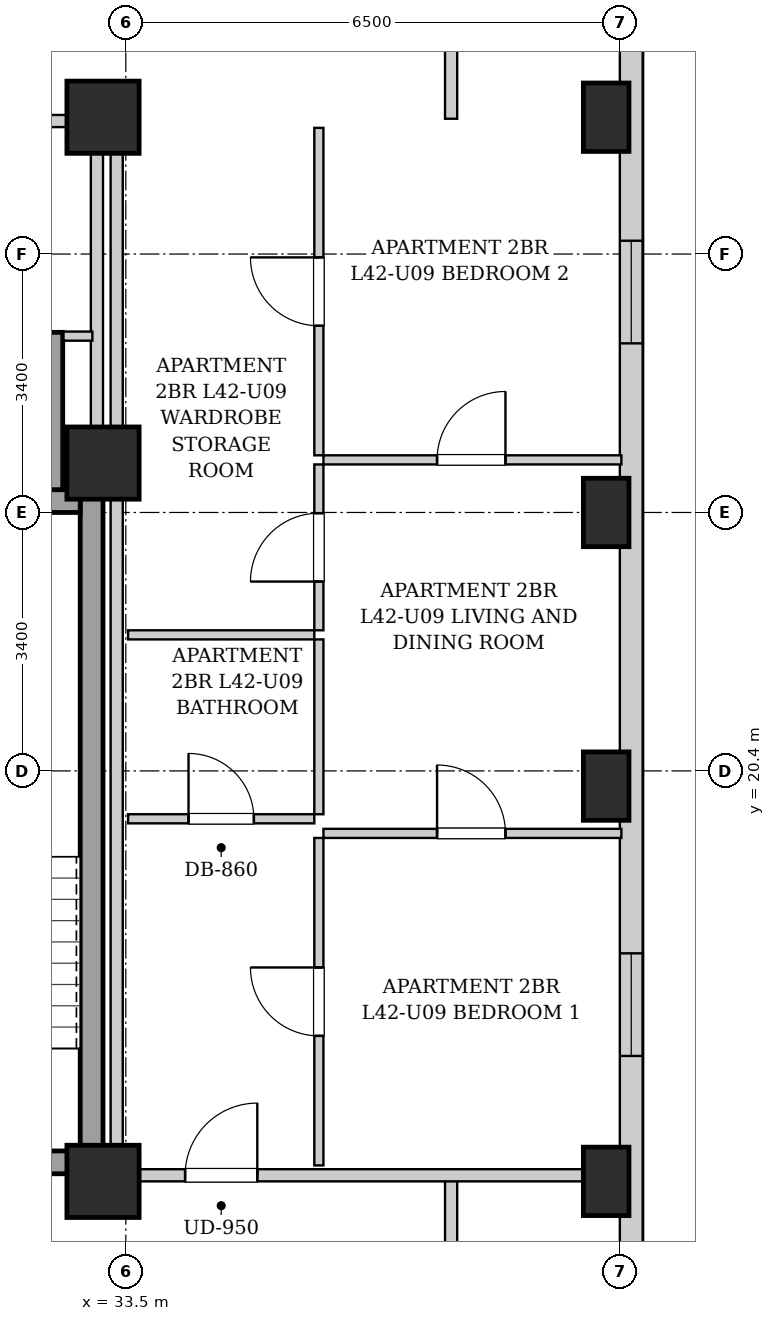
"""IFC4 building model, lengths in metres.
Left out: names, types, materials, properties, quantities, classifications, styles, units other than length and angle.
Written with IfcOpenShell. Run it as: python <this file> out.ifc"""

import sys

from ifc_helpers import new_model, si_unit, direction, frame, frame_2d, origin, origin_2d, place, context, subcontext, project, spatial, rectangle, extrude, element, fill, save


model = new_model("IFC4")
c1 = context("Model", 3, precision=1e-05, world=origin(), true_north=direction((0.0, 1.0)))
c2 = subcontext(c1, "Body", "Model", "MODEL_VIEW")
j1 = project(units=[si_unit("LENGTHUNIT", "METRE"), si_unit("PLANEANGLEUNIT", "RADIAN")], contexts=[c1])
p1 = place(None, origin())
s1 = spatial("IfcSite", under=j1, at=p1, CompositionType="ELEMENT")
p2 = place(p1, origin())
s2 = spatial("IfcBuilding", under=s1, at=p2, CompositionType="ELEMENT")
p3 = place(p2, frame((0.0, 0.0, 147.15)))
s3 = spatial("IfcBuildingStorey", under=s2, at=p3, CompositionType="ELEMENT", Elevation=147.15)
for number, where, z_axis, x_axis in (
    (1, (39.82, 15.0, 0.0), (0.0, 0.0, 1.0), (1.0, 0.0, 0.0)),
    (2, (39.82, 20.2, 0.0), (0.0, 0.0, 1.0), (1.0, 0.0, 0.0)),
    (3, (39.82, 23.8, 0.0), (0.0, 0.0, 1.0), (1.0, 0.0, 0.0)),
    (4, (39.82, 29.0, 0.0), (0.0, 0.0, 1.0), (1.0, 0.0, 0.0)),
):
    element("IfcColumn", number, at=place(p3, frame(where, z_axis=z_axis, x_axis=x_axis)), inside=s3, PredefinedType="COLUMN", context=c2, shape_type="SweptSolid", body=[
        extrude(rectangle(XDim=0.6, YDim=0.9, at=origin_2d()), origin(), (0.0, 0.0, 1.0), 3.25),
    ])
for number, where, z_axis, x_axis in (
    (5, (33.2, 15.0, 0.0), (0.0, 0.0, 1.0), (1.0, 0.0, 0.0)),
    (6, (33.2, 29.0, 0.0), (0.0, 0.0, 1.0), (1.0, 0.0, 0.0)),
    (7, (33.2, 24.45, 0.0), (0.0, 0.0, 1.0), (1.0, 0.0, 0.0)),
):
    element("IfcColumn", number, at=place(p3, frame(where, z_axis=z_axis, x_axis=x_axis)), inside=s3, PredefinedType="COLUMN", context=c2, shape_type="SweptSolid", body=[
        extrude(rectangle(XDim=0.95, YDim=0.95, at=origin_2d()), origin(), (0.0, 0.0, 1.0), 3.25),
    ])
p4 = place(p3, frame((40.15, 40.8, 0.0), z_axis=(0.0, 0.0, 1.0), x_axis=(0.0, -1.0, 0.0)))
e8 = element("IfcWall", 8, at=p4, inside=s3, PredefinedType="SOLIDWALL", context=c2, shape_type="SweptSolid", body=[
    extrude(rectangle(XDim=34.5, YDim=0.3, at=frame_2d((17.25, 0.0))), origin(), (0.0, 0.0, 1.0), 2.99),
])
p5 = place(p4, frame((31.575, 0.0, 0.55)))
e9 = element("IfcOpeningElement", 9, at=p5, cuts=e8, PredefinedType="OPENING", context=c2, shape_type="SweptSolid", body=[
    extrude(rectangle(XDim=1.35, YDim=1.2, at=frame_2d((0.675, 0.6))), frame((0.0, 0.16, 0.0), z_axis=(0.0, -1.0, 0.0), x_axis=(1.0, 0.0, 0.0)), (0.0, 0.0, 1.0), 0.32),
])
p6 = place(p4, frame((3.075, 0.0, 0.55)))
e10 = element("IfcOpeningElement", 10, at=p6, cuts=e8, PredefinedType="OPENING", context=c2, shape_type="SweptSolid", body=[
    extrude(rectangle(XDim=1.35, YDim=1.2, at=frame_2d((0.675, 0.6))), frame((0.0, 0.16, 0.0), z_axis=(0.0, -1.0, 0.0), x_axis=(1.0, 0.0, 0.0)), (0.0, 0.0, 1.0), 0.32),
])
p7 = place(p4, frame((1.085, 0.0, 0.55)))
e11 = element("IfcOpeningElement", 11, at=p7, cuts=e8, PredefinedType="OPENING", context=c2, shape_type="SweptSolid", body=[
    extrude(rectangle(XDim=1.35, YDim=1.2, at=frame_2d((0.675, 0.6))), frame((0.0, 0.16, 0.0), z_axis=(0.0, -1.0, 0.0), x_axis=(1.0, 0.0, 0.0)), (0.0, 0.0, 1.0), 0.32),
])
p8 = place(p4, frame((22.8, 0.0, 0.55)))
e12 = element("IfcOpeningElement", 12, at=p8, cuts=e8, PredefinedType="OPENING", context=c2, shape_type="SweptSolid", body=[
    extrude(rectangle(XDim=1.35, YDim=1.2, at=frame_2d((0.675, 0.6))), frame((0.0, 0.16, 0.0), z_axis=(0.0, -1.0, 0.0), x_axis=(1.0, 0.0, 0.0)), (0.0, 0.0, 1.0), 0.32),
])
p9 = place(p4, frame((13.425, 0.0, 0.55)))
e13 = element("IfcOpeningElement", 13, at=p9, cuts=e8, PredefinedType="OPENING", context=c2, shape_type="SweptSolid", body=[
    extrude(rectangle(XDim=1.35, YDim=1.2, at=frame_2d((0.675, 0.6))), frame((0.0, 0.16, 0.0), z_axis=(0.0, -1.0, 0.0), x_axis=(1.0, 0.0, 0.0)), (0.0, 0.0, 1.0), 0.32),
])
p10 = place(p3, frame((33.05, 15.1, 0.0), z_axis=(0.0, 0.0, 1.0), x_axis=(0.0, 1.0, 0.0)))
e14 = element("IfcWall", 14, at=p10, inside=s3, PredefinedType="SHEAR", context=c2, shape_type="SweptSolid", body=[
    extrude(rectangle(XDim=9.0, YDim=0.3, at=frame_2d((4.5, 0.0))), origin(), (0.0, 0.0, 1.0), 2.99),
])
p11 = place(p3, frame((30.05, 23.95, 0.0), z_axis=(0.0, 0.0, 1.0), x_axis=(1.0, 0.0, 0.0)))
e15 = element("IfcWall", 15, at=p11, inside=s3, PredefinedType="SHEAR", context=c2, shape_type="SweptSolid", body=[
    extrude(rectangle(XDim=2.85, YDim=0.3, at=frame_2d((1.425, 0.0))), origin(), (0.0, 0.0, 1.0), 2.99),
])
p12 = place(p3, frame((30.05, 15.25, 0.0), z_axis=(0.0, 0.0, 1.0), x_axis=(1.0, 0.0, 0.0)))
e16 = element("IfcWall", 16, at=p12, inside=s3, PredefinedType="SHEAR", context=c2, shape_type="SweptSolid", body=[
    extrude(rectangle(XDim=2.85, YDim=0.3, at=frame_2d((1.425, 0.0))), origin(), (0.0, 0.0, 1.0), 2.99),
])
p13 = place(p12, frame((0.86, 0.0, 0.0)))
e17 = element("IfcOpeningElement", 17, at=p13, cuts=e16, PredefinedType="OPENING", context=c2, shape_type="SweptSolid", body=[
    extrude(rectangle(XDim=1.1, YDim=2.05, at=frame_2d((0.55, 1.025))), frame((0.0, 0.16, 0.0), z_axis=(0.0, -1.0, 0.0), x_axis=(1.0, 0.0, 0.0)), (0.0, 0.0, 1.0), 0.32),
])
p14 = place(p3, frame((32.56, 24.1, 0.0), z_axis=(0.0, 0.0, 1.0), x_axis=(0.0, 1.0, 0.0)))
e18 = element("IfcWall", 18, at=p14, inside=s3, PredefinedType="SHEAR", context=c2, shape_type="SweptSolid", body=[
    extrude(rectangle(XDim=2.07, YDim=0.22, at=frame_2d((1.035, 0.0))), origin(), (0.0, 0.0, 1.0), 2.99),
])
p15 = place(p3, frame((33.12, 24.12, 0.0), z_axis=(0.0, 0.0, 1.0), x_axis=(0.0, 1.0, 0.0)))
e19 = element("IfcWall", 19, at=p15, inside=s3, PredefinedType="PARTITIONING", context=c2, shape_type="SweptSolid", body=[
    extrude(rectangle(XDim=4.76, YDim=0.16, at=frame_2d((2.38, 0.0))), origin(), (0.0, 0.0, 1.0), 2.325),
])
p16 = place(p3, frame((32.68, 26.12, 0.0), z_axis=(0.0, 0.0, 1.0), x_axis=(1.0, 0.0, 0.0)))
e20 = element("IfcWall", 20, at=p16, inside=s3, PredefinedType="PARTITIONING", context=c2, shape_type="SweptSolid", body=[
    extrude(rectangle(XDim=0.38, YDim=0.12, at=frame_2d((0.19, 0.0))), origin(), (0.0, 0.0, 1.0), 2.99),
])
p17 = place(p3, frame((30.08, 28.95, 0.0), z_axis=(0.0, 0.0, 1.0), x_axis=(1.0, 0.0, 0.0)))
e21 = element("IfcWall", 21, at=p17, inside=s3, PredefinedType="PARTITIONING", context=c2, shape_type="SweptSolid", body=[
    extrude(rectangle(XDim=2.96, YDim=0.16, at=frame_2d((1.48, 0.0))), origin(), (0.0, 0.0, 1.0), 2.99),
])
p18 = place(p17, frame((1.045, 0.0, 0.0)))
e22 = element("IfcOpeningElement", 22, at=p18, cuts=e21, PredefinedType="OPENING", context=c2, shape_type="SweptSolid", body=[
    extrude(rectangle(XDim=0.86, YDim=2.05, at=frame_2d((0.43, 1.025))), frame((0.0, 0.09, 0.0), z_axis=(0.0, -1.0, 0.0), x_axis=(1.0, 0.0, 0.0)), (0.0, 0.0, 1.0), 0.18),
])
for number, where, z_axis, x_axis in (
    (23, (37.78, 13.35, 0.0), (0.0, 0.0, 1.0), (0.0, 1.0, 0.0)),
    (24, (37.78, 28.98, 0.0), (0.0, 0.0, 1.0), (0.0, 1.0, 0.0)),
):
    element("IfcWall", number, at=place(p3, frame(where, z_axis=z_axis, x_axis=x_axis)), inside=s3, PredefinedType="PARTITIONING", context=c2, shape_type="SweptSolid", body=[
        extrude(rectangle(XDim=1.74, YDim=0.16, at=frame_2d((0.87, 0.0))), origin(), (0.0, 0.0, 1.0), 2.99),
    ])
p19 = place(p3, frame((33.38, 15.08, 0.0), z_axis=(0.0, 0.0, 1.0), x_axis=(1.0, 0.0, 0.0)))
e25 = element("IfcWall", 25, at=p19, inside=s3, PredefinedType="PARTITIONING", context=c2, shape_type="SweptSolid", body=[
    extrude(rectangle(XDim=6.64, YDim=0.16, at=frame_2d((3.32, 0.0))), origin(), (0.0, 0.0, 1.0), 2.442),
])
p20 = place(p19, frame((0.9, 0.0, 0.0)))
e26 = element("IfcOpeningElement", 26, at=p20, cuts=e25, PredefinedType="OPENING", context=c2, shape_type="SweptSolid", body=[
    extrude(rectangle(XDim=0.95, YDim=2.1, at=frame_2d((0.475, 1.05))), frame((0.0, 0.09, 0.0), z_axis=(0.0, -1.0, 0.0), x_axis=(1.0, 0.0, 0.0)), (0.0, 0.0, 1.0), 0.18),
])
p21 = place(p3, frame((33.53, 22.19, 0.0), z_axis=(0.0, 0.0, 1.0), x_axis=(1.0, 0.0, 0.0)))
e27 = element("IfcWall", 27, at=p21, inside=s3, PredefinedType="PARTITIONING", context=c2, shape_type="SweptSolid", body=[
    extrude(rectangle(XDim=2.45, YDim=0.12, at=frame_2d((1.225, 0.0))), origin(), (0.0, 0.0, 1.0), 2.99),
])
p22 = place(p3, frame((36.04, 22.25, 0.0), z_axis=(0.0, 0.0, 1.0), x_axis=(0.0, 1.0, 0.0)))
e28 = element("IfcWall", 28, at=p22, inside=s3, PredefinedType="PARTITIONING", context=c2, shape_type="SweptSolid", body=[
    extrude(rectangle(XDim=2.182, YDim=0.12, at=frame_2d((1.091, 0.0))), origin(), (0.0, 0.0, 1.0), 2.99),
])
p23 = place(p22, frame((0.641, 0.0, 0.0)))
e29 = element("IfcOpeningElement", 29, at=p23, cuts=e28, PredefinedType="OPENING", context=c2, shape_type="SweptSolid", body=[
    extrude(rectangle(XDim=0.9, YDim=2.05, at=frame_2d((0.45, 1.025))), frame((0.0, 0.07, 0.0), z_axis=(0.0, -1.0, 0.0), x_axis=(1.0, 0.0, 0.0)), (0.0, 0.0, 1.0), 0.14),
])
p24 = place(p3, frame((36.04, 24.552, 0.0), z_axis=(0.0, 0.0, 1.0), x_axis=(0.0, 1.0, 0.0)))
e30 = element("IfcWall", 30, at=p24, inside=s3, PredefinedType="PARTITIONING", context=c2, shape_type="SweptSolid", body=[
    extrude(rectangle(XDim=4.308, YDim=0.12, at=frame_2d((2.154, 0.0))), origin(), (0.0, 0.0, 1.0), 2.99),
])
p25 = place(p24, frame((1.704, 0.0, 0.0)))
e31 = element("IfcOpeningElement", 31, at=p25, cuts=e30, PredefinedType="OPENING", context=c2, shape_type="SweptSolid", body=[
    extrude(rectangle(XDim=0.9, YDim=2.05, at=frame_2d((0.45, 1.025))), frame((0.0, 0.07, 0.0), z_axis=(0.0, -1.0, 0.0), x_axis=(1.0, 0.0, 0.0)), (0.0, 0.0, 1.0), 0.14),
])
p26 = place(p3, frame((33.53, 19.77, 0.0), z_axis=(0.0, 0.0, 1.0), x_axis=(1.0, 0.0, 0.0)))
e32 = element("IfcWall", 32, at=p26, inside=s3, PredefinedType="PARTITIONING", context=c2, shape_type="SweptSolid", body=[
    extrude(rectangle(XDim=2.45, YDim=0.12, at=frame_2d((1.225, 0.0))), origin(), (0.0, 0.0, 1.0), 2.99),
])
p27 = place(p26, frame((0.795, 0.0, 0.0)))
e33 = element("IfcOpeningElement", 33, at=p27, cuts=e32, PredefinedType="OPENING", context=c2, shape_type="SweptSolid", body=[
    extrude(rectangle(XDim=0.86, YDim=2.05, at=frame_2d((0.43, 1.025))), frame((0.0, 0.07, 0.0), z_axis=(0.0, -1.0, 0.0), x_axis=(1.0, 0.0, 0.0)), (0.0, 0.0, 1.0), 0.14),
])
p28 = place(p3, frame((36.04, 19.83, 0.0), z_axis=(0.0, 0.0, 1.0), x_axis=(0.0, 1.0, 0.0)))
e34 = element("IfcWall", 34, at=p28, inside=s3, PredefinedType="PARTITIONING", context=c2, shape_type="SweptSolid", body=[
    extrude(rectangle(XDim=2.3, YDim=0.12, at=frame_2d((1.15, 0.0))), origin(), (0.0, 0.0, 1.0), 2.99),
])
p29 = place(p3, frame((36.04, 15.21, 0.0), z_axis=(0.0, 0.0, 1.0), x_axis=(0.0, 1.0, 0.0)))
e35 = element("IfcWall", 35, at=p29, inside=s3, PredefinedType="PARTITIONING", context=c2, shape_type="SweptSolid", body=[
    extrude(rectangle(XDim=4.308, YDim=0.12, at=frame_2d((2.154, 0.0))), origin(), (0.0, 0.0, 1.0), 2.99),
])
p30 = place(p29, frame((1.704, 0.0, 0.0)))
e36 = element("IfcOpeningElement", 36, at=p30, cuts=e35, PredefinedType="OPENING", context=c2, shape_type="SweptSolid", body=[
    extrude(rectangle(XDim=0.9, YDim=2.05, at=frame_2d((0.45, 1.025))), frame((0.0, 0.07, 0.0), z_axis=(0.0, -1.0, 0.0), x_axis=(1.0, 0.0, 0.0)), (0.0, 0.0, 1.0), 0.14),
])
p31 = place(p3, frame((36.1, 19.578, 0.0), z_axis=(0.0, 0.0, 1.0), x_axis=(1.0, 0.0, 0.0)))
e37 = element("IfcWall", 37, at=p31, inside=s3, PredefinedType="PARTITIONING", context=c2, shape_type="SweptSolid", body=[
    extrude(rectangle(XDim=3.92, YDim=0.12, at=frame_2d((1.96, 0.0))), origin(), (0.0, 0.0, 1.0), 2.99),
])
p32 = place(p31, frame((1.495, 0.0, 0.0)))
e38 = element("IfcOpeningElement", 38, at=p32, cuts=e37, PredefinedType="OPENING", context=c2, shape_type="SweptSolid", body=[
    extrude(rectangle(XDim=0.9, YDim=2.05, at=frame_2d((0.45, 1.025))), frame((0.0, 0.07, 0.0), z_axis=(0.0, -1.0, 0.0), x_axis=(1.0, 0.0, 0.0)), (0.0, 0.0, 1.0), 0.14),
])
p33 = place(p3, frame((36.1, 24.492, 0.0), z_axis=(0.0, 0.0, 1.0), x_axis=(1.0, 0.0, 0.0)))
e39 = element("IfcWall", 39, at=p33, inside=s3, PredefinedType="PARTITIONING", context=c2, shape_type="SweptSolid", body=[
    extrude(rectangle(XDim=3.92, YDim=0.12, at=frame_2d((1.96, 0.0))), origin(), (0.0, 0.0, 1.0), 2.621),
])
p34 = place(p33, frame((1.495, 0.0, 0.0)))
e40 = element("IfcOpeningElement", 40, at=p34, cuts=e39, PredefinedType="OPENING", context=c2, shape_type="SweptSolid", body=[
    extrude(rectangle(XDim=0.9, YDim=2.05, at=frame_2d((0.45, 1.025))), frame((0.0, 0.07, 0.0), z_axis=(0.0, -1.0, 0.0), x_axis=(1.0, 0.0, 0.0)), (0.0, 0.0, 1.0), 0.14),
])
p35 = place(p3, frame((33.38, 15.02, 0.0), z_axis=(0.0, 0.0, 1.0), x_axis=(0.0, 1.0, 0.0)))
e41 = element("IfcWall", 41, at=p35, inside=s3, PredefinedType="PARTITIONING", context=c2, shape_type="SweptSolid", body=[
    extrude(rectangle(XDim=13.98, YDim=0.16, at=frame_2d((6.99, 0.0))), origin(), (0.0, 0.0, 1.0), 2.325),
])
p36 = place(p20, origin())
e42 = element("IfcDoor", 42, at=p36, inside=s3, OperationType="SINGLE_SWING_RIGHT", PredefinedType="DOOR", context=c2, shape_type="SweptSolid", body=[
    extrude(rectangle(XDim=0.95, YDim=2.1, at=frame_2d((0.475, 1.05))), frame((0.0, 0.025, 0.0), z_axis=(0.0, -1.0, 0.0), x_axis=(1.0, 0.0, 0.0)), (0.0, 0.0, 1.0), 0.05),
])
fill(e26, e42)
p37 = place(p23, origin())
e43 = element("IfcDoor", 43, at=p37, inside=s3, OperationType="SINGLE_SWING_LEFT", PredefinedType="DOOR", context=c2, shape_type="SweptSolid", body=[
    extrude(rectangle(XDim=0.9, YDim=2.05, at=frame_2d((0.45, 1.025))), frame((0.0, 0.025, 0.0), z_axis=(0.0, -1.0, 0.0), x_axis=(1.0, 0.0, 0.0)), (0.0, 0.0, 1.0), 0.05),
])
fill(e29, e43)
p38 = place(p25, origin())
e44 = element("IfcDoor", 44, at=p38, inside=s3, OperationType="SINGLE_SWING_RIGHT", PredefinedType="DOOR", context=c2, shape_type="SweptSolid", body=[
    extrude(rectangle(XDim=0.9, YDim=2.05, at=frame_2d((0.45, 1.025))), frame((0.0, 0.025, 0.0), z_axis=(0.0, -1.0, 0.0), x_axis=(1.0, 0.0, 0.0)), (0.0, 0.0, 1.0), 0.05),
])
fill(e31, e44)
p39 = place(p27, origin())
e45 = element("IfcDoor", 45, at=p39, inside=s3, OperationType="SINGLE_SWING_LEFT", PredefinedType="DOOR", context=c2, shape_type="SweptSolid", body=[
    extrude(rectangle(XDim=0.86, YDim=2.05, at=frame_2d((0.43, 1.025))), frame((0.0, 0.025, 0.0), z_axis=(0.0, -1.0, 0.0), x_axis=(1.0, 0.0, 0.0)), (0.0, 0.0, 1.0), 0.05),
])
fill(e33, e45)
p40 = place(p30, origin())
e46 = element("IfcDoor", 46, at=p40, inside=s3, OperationType="SINGLE_SWING_RIGHT", PredefinedType="DOOR", context=c2, shape_type="SweptSolid", body=[
    extrude(rectangle(XDim=0.9, YDim=2.05, at=frame_2d((0.45, 1.025))), frame((0.0, 0.025, 0.0), z_axis=(0.0, -1.0, 0.0), x_axis=(1.0, 0.0, 0.0)), (0.0, 0.0, 1.0), 0.05),
])
fill(e36, e46)
p41 = place(p32, origin())
e47 = element("IfcDoor", 47, at=p41, inside=s3, OperationType="SINGLE_SWING_LEFT", PredefinedType="DOOR", context=c2, shape_type="SweptSolid", body=[
    extrude(rectangle(XDim=0.9, YDim=2.05, at=frame_2d((0.45, 1.025))), frame((0.0, 0.025, 0.0), z_axis=(0.0, -1.0, 0.0), x_axis=(1.0, 0.0, 0.0)), (0.0, 0.0, 1.0), 0.05),
])
fill(e38, e47)
p42 = place(p34, origin())
e48 = element("IfcDoor", 48, at=p42, inside=s3, OperationType="SINGLE_SWING_RIGHT", PredefinedType="DOOR", context=c2, shape_type="SweptSolid", body=[
    extrude(rectangle(XDim=0.9, YDim=2.05, at=frame_2d((0.45, 1.025))), frame((0.0, 0.025, 0.0), z_axis=(0.0, -1.0, 0.0), x_axis=(1.0, 0.0, 0.0)), (0.0, 0.0, 1.0), 0.05),
])
fill(e40, e48)
p43 = place(p8, origin())
e49 = element("IfcWindow", 49, at=p43, inside=s3, PartitioningType="SINGLE_PANEL", PredefinedType="WINDOW", context=c2, shape_type="SweptSolid", body=[
    extrude(rectangle(XDim=1.35, YDim=1.2, at=frame_2d((0.675, 0.6))), frame((0.0, 0.03, 0.0), z_axis=(0.0, -1.0, 0.0), x_axis=(1.0, 0.0, 0.0)), (0.0, 0.0, 1.0), 0.06),
])
fill(e12, e49)
p44 = place(p9, origin())
e50 = element("IfcWindow", 50, at=p44, inside=s3, PartitioningType="SINGLE_PANEL", PredefinedType="WINDOW", context=c2, shape_type="SweptSolid", body=[
    extrude(rectangle(XDim=1.35, YDim=1.2, at=frame_2d((0.675, 0.6))), frame((0.0, 0.03, 0.0), z_axis=(0.0, -1.0, 0.0), x_axis=(1.0, 0.0, 0.0)), (0.0, 0.0, 1.0), 0.06),
])
fill(e13, e50)
save(model, sys.argv[1])
